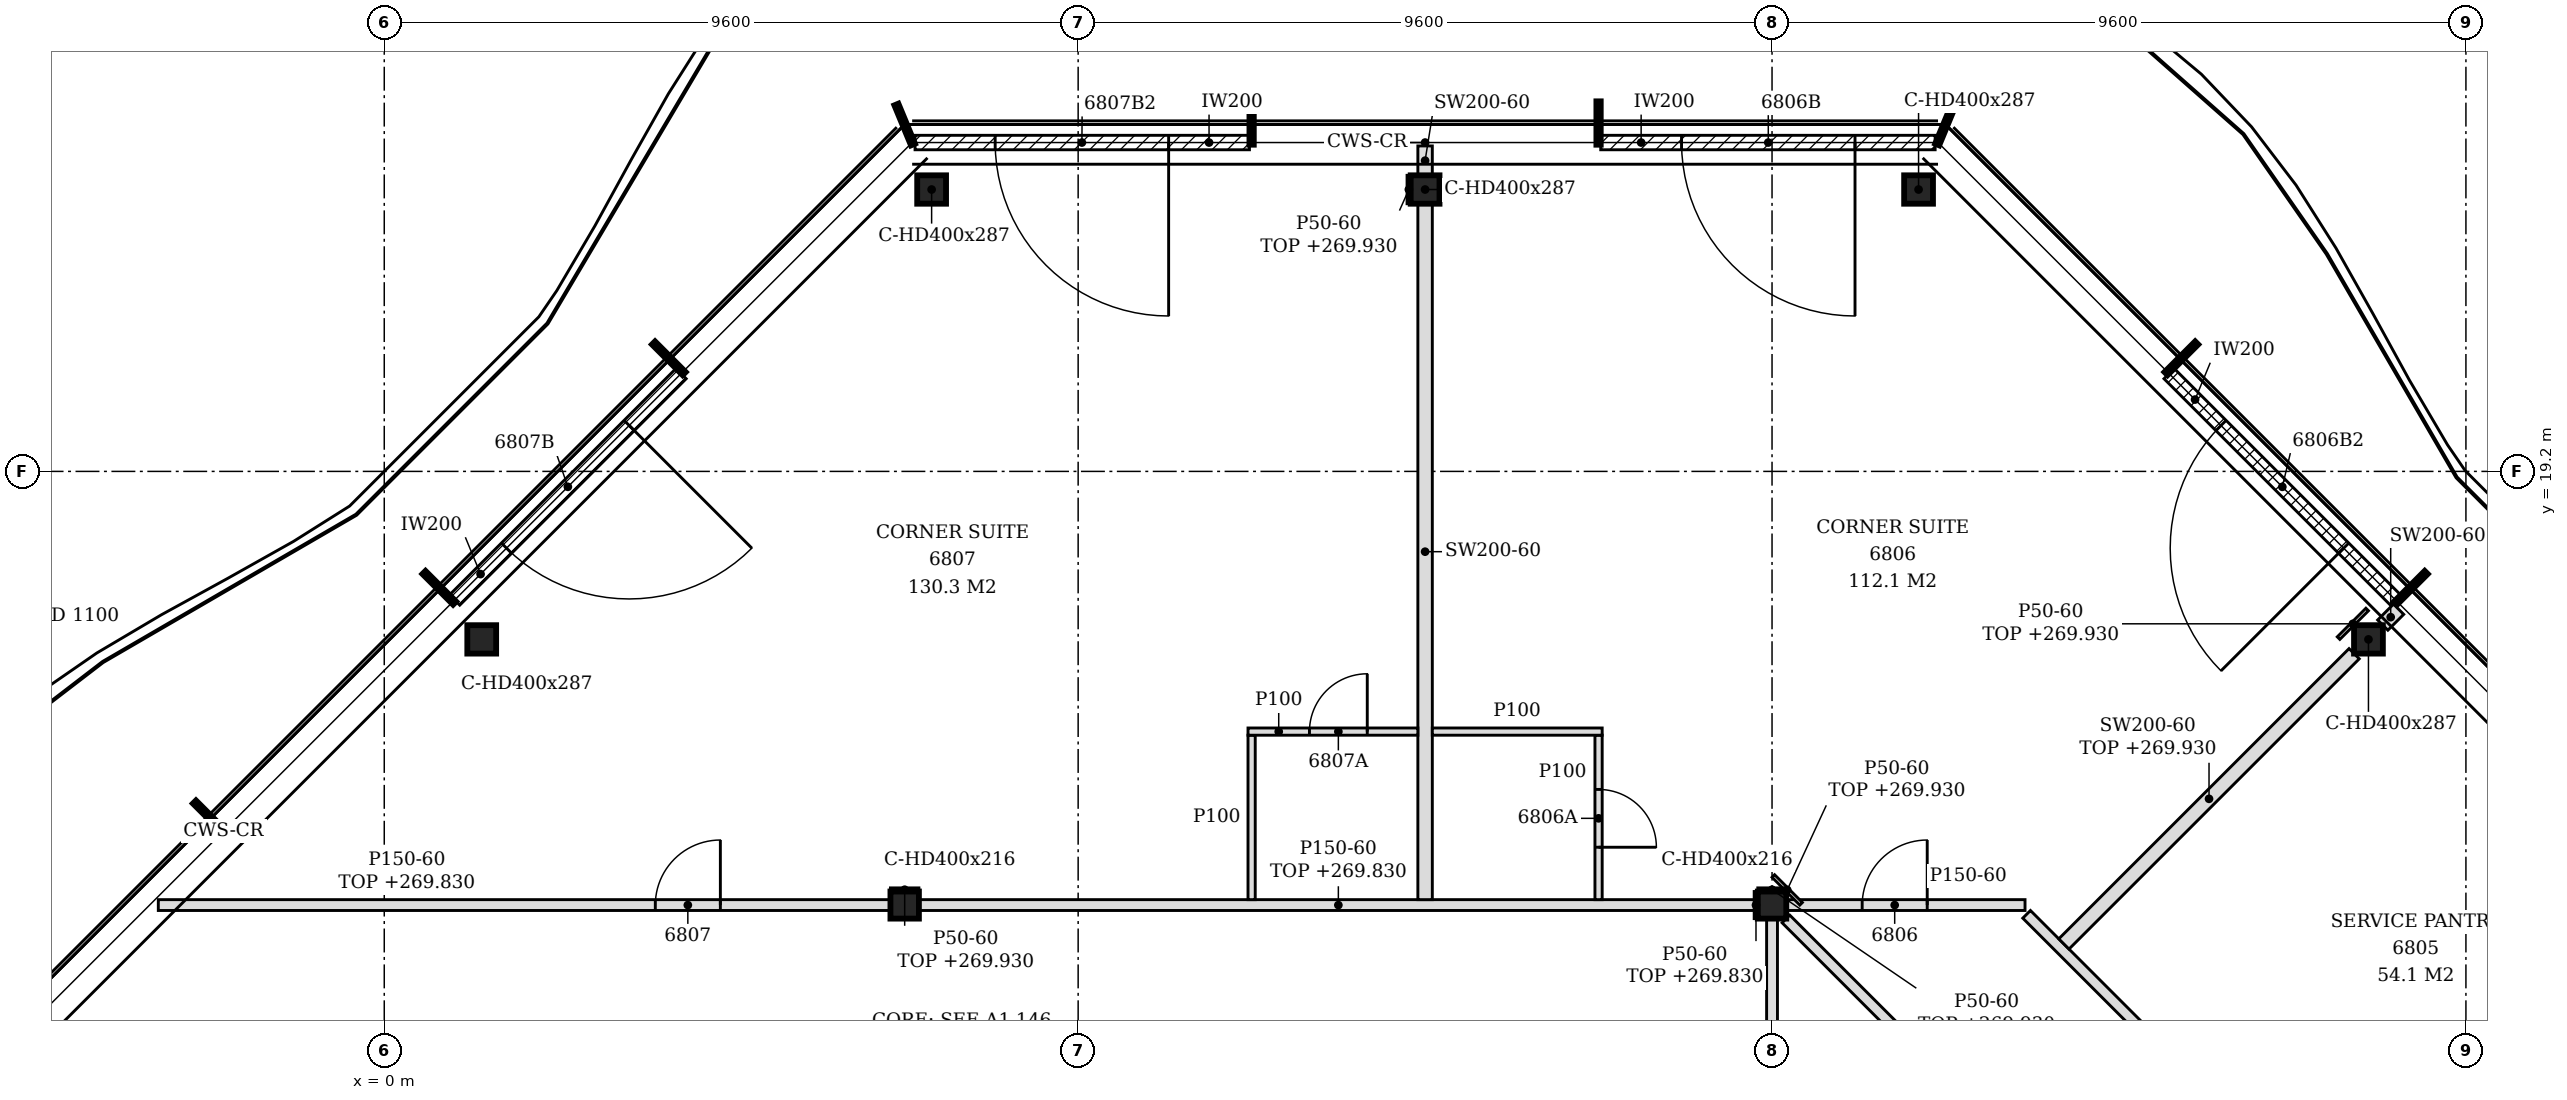
"""IFC4 building model, lengths in metres.
Left out: names, types, materials, properties, quantities, classifications, styles, units other than length and angle.
Written with IfcOpenShell. Run it as: python <this file> out.ifc"""

import sys

from ifc_helpers import new_model, si_unit, direction, frame, frame_2d, origin, origin_2d, place, context, subcontext, project, spatial, polyline, rectangle, i_section, outline, extrude, element, fill, save


model = new_model("IFC4")
c1 = context("Model", 3, precision=1e-05, world=origin(), true_north=direction((0.0, 1.0)))
c2 = subcontext(c1, "Body", "Model", "MODEL_VIEW")
j1 = project(units=[si_unit("LENGTHUNIT", "METRE"), si_unit("PLANEANGLEUNIT", "RADIAN")], contexts=[c1])
p1 = place(None, origin())
s1 = spatial("IfcSite", under=j1, at=p1, CompositionType="ELEMENT")
p2 = place(p1, origin())
s2 = spatial("IfcBuilding", under=s1, at=p2, CompositionType="ELEMENT")
p3 = place(p2, frame((0.0, 0.0, 267.0)))
s3 = spatial("IfcBuildingStorey", under=s2, at=p3, CompositionType="ELEMENT", Elevation=267.0)
for number, where, z_axis, x_axis in (
    (1, (27.451, 16.876, -0.15), (0.0, 0.0, 1.0), (1.0, 0.0, 0.0)),
    (2, (21.227, 23.1, -0.15), (0.0, 0.0, 1.0), (1.0, 0.0, 0.0)),
    (3, (14.4, 23.1, -0.15), (0.0, 0.0, 1.0), (1.0, 0.0, 0.0)),
    (4, (7.573, 23.1, -0.15), (0.0, 0.0, 1.0), (1.0, 0.0, 0.0)),
    (5, (1.348, 16.876, -0.15), (0.0, 0.0, 1.0), (1.0, 0.0, 0.0)),
):
    element("IfcColumn", number, at=place(p3, frame(where, z_axis=z_axis, x_axis=x_axis)), inside=s3, PredefinedType="COLUMN", context=c2, shape_type="SweptSolid", body=[
        extrude(i_section(OverallWidth=0.399, OverallDepth=0.393, WebThickness=0.023, FlangeThickness=0.037, FilletRadius=0.015, at=origin_2d()), origin(), (0.0, 0.0, 1.0), 3.6),
    ])
for number, where, z_axis, x_axis in (
    (6, (7.2, 13.2, -0.15), (0.0, 0.0, 1.0), (1.0, 0.0, 0.0)),
    (7, (19.2, 13.2, -0.15), (0.0, 0.0, 1.0), (1.0, 0.0, 0.0)),
):
    element("IfcColumn", number, at=place(p3, frame(where, z_axis=z_axis, x_axis=x_axis)), inside=s3, PredefinedType="COLUMN", context=c2, shape_type="SweptSolid", body=[
        extrude(i_section(OverallWidth=0.394, OverallDepth=0.375, WebThickness=0.017, FlangeThickness=0.028, FilletRadius=0.015, at=origin_2d()), origin(), (0.0, 0.0, 1.0), 3.6),
    ])
p4 = place(p3, frame((27.826, 17.42, 0.0), z_axis=(0.0, 0.0, 1.0), x_axis=(-0.707079231393, 0.707134329907, 0.0)))
e8 = element("IfcWall", 8, at=p4, inside=s3, PredefinedType="NOTDEFINED", context=c2, shape_type="SweptSolid", body=[
    extrude(rectangle(XDim=4.431, YDim=0.2, at=frame_2d((2.215, 0.0))), origin(), (0.0, 0.0, 1.0), 3.45),
])
p5 = place(p4, frame((1.015, 0.0, 0.0)))
e9 = element("IfcOpeningElement", 9, at=p5, cuts=e8, PredefinedType="OPENING", context=c2, shape_type="SweptSolid", body=[
    extrude(rectangle(XDim=2.4, YDim=2.4, at=frame_2d((1.2, 1.2))), frame((0.0, 0.11, 0.0), z_axis=(0.0, -1.0, 0.0), x_axis=(1.0, 0.0, 0.0)), (0.0, 0.0, 1.0), 0.22),
])
p6 = place(p3, frame((21.457, 23.75, 0.0), z_axis=(0.0, 0.0, 1.0), x_axis=(-1.0, 0.0, 0.0)))
e10 = element("IfcWall", 10, at=p6, inside=s3, PredefinedType="NOTDEFINED", context=c2, shape_type="SweptSolid", body=[
    extrude(rectangle(XDim=4.626, YDim=0.2, at=frame_2d((2.313, 0.0))), origin(), (0.0, 0.0, 1.0), 3.45),
])
p7 = place(p6, frame((1.108, 0.0, 0.0)))
e11 = element("IfcOpeningElement", 11, at=p7, cuts=e10, PredefinedType="OPENING", context=c2, shape_type="SweptSolid", body=[
    extrude(rectangle(XDim=2.4, YDim=2.4, at=frame_2d((1.2, 1.2))), frame((0.0, 0.11, 0.0), z_axis=(0.0, -1.0, 0.0), x_axis=(1.0, 0.0, 0.0)), (0.0, 0.0, 1.0), 0.22),
])
p8 = place(p3, frame((11.97, 23.75, 0.0), z_axis=(0.0, 0.0, 1.0), x_axis=(-1.0, 0.0, 0.0)))
e12 = element("IfcWall", 12, at=p8, inside=s3, PredefinedType="NOTDEFINED", context=c2, shape_type="SweptSolid", body=[
    extrude(rectangle(XDim=4.626, YDim=0.2, at=frame_2d((2.313, 0.0))), origin(), (0.0, 0.0, 1.0), 3.45),
])
p9 = place(p8, frame((1.118, 0.0, 0.0)))
e13 = element("IfcOpeningElement", 13, at=p9, cuts=e12, PredefinedType="OPENING", context=c2, shape_type="SweptSolid", body=[
    extrude(rectangle(XDim=2.4, YDim=2.4, at=frame_2d((1.2, 1.2))), frame((0.0, 0.11, 0.0), z_axis=(0.0, -1.0, 0.0), x_axis=(1.0, 0.0, 0.0)), (0.0, 0.0, 1.0), 0.22),
])
p10 = place(p3, frame((4.107, 20.553, 0.0), z_axis=(0.0, 0.0, 1.0), x_axis=(-0.707079231393, -0.707134329907, 0.0)))
e14 = element("IfcWall", 14, at=p10, inside=s3, PredefinedType="NOTDEFINED", context=c2, shape_type="SweptSolid", body=[
    extrude(rectangle(XDim=4.431, YDim=0.2, at=frame_2d((2.215, 0.0))), origin(), (0.0, 0.0, 1.0), 3.45),
])
p11 = place(p10, frame((1.015, 0.0, 0.0)))
e15 = element("IfcOpeningElement", 15, at=p11, cuts=e14, PredefinedType="OPENING", context=c2, shape_type="SweptSolid", body=[
    extrude(rectangle(XDim=2.4, YDim=2.4, at=frame_2d((1.2, 1.2))), frame((0.0, 0.11, 0.0), z_axis=(0.0, -1.0, 0.0), x_axis=(1.0, 0.0, 0.0)), (0.0, 0.0, 1.0), 0.22),
])
p12 = place(p3, frame((29.947, 2.453, 0.0), z_axis=(0.0, 0.0, 1.0), x_axis=(-0.707098603185, 0.707114959093, 0.0)))
e16 = element("IfcWall", 16, at=p12, inside=s3, PredefinedType="PARTITIONING", context=c2, shape_type="SweptSolid", body=[
    extrude(rectangle(XDim=14.927, YDim=0.15, at=frame_2d((7.463, 0.0))), origin(), (0.0, 0.0, 1.0), 2.88),
])
p13 = place(p12, frame((1.175, 0.0, 0.0)))
e17 = element("IfcOpeningElement", 17, at=p13, cuts=e16, PredefinedType="OPENING", context=c2, shape_type="SweptSolid", body=[
    extrude(rectangle(XDim=0.8, YDim=2.1, at=frame_2d((0.4, 1.05))), frame((0.0, 0.085, 0.0), z_axis=(0.0, -1.0, 0.0), x_axis=(1.0, 0.0, 0.0)), (0.0, 0.0, 1.0), 0.17),
])
p14 = place(p3, frame((33.341, 2.453, 0.0), z_axis=(0.0, 0.0, 1.0), x_axis=(-0.707098652635, 0.707114909645, 0.0)))
e18 = element("IfcWall", 18, at=p14, inside=s3, PredefinedType="PARTITIONING", context=c2, shape_type="SweptSolid", body=[
    extrude(rectangle(XDim=15.018, YDim=0.15, at=frame_2d((7.509, 0.0))), origin(), (0.0, 0.0, 1.0), 2.88),
])
p15 = place(p14, frame((2.347, 0.0, 0.0)))
e19 = element("IfcOpeningElement", 19, at=p15, cuts=e18, PredefinedType="OPENING", context=c2, shape_type="SweptSolid", body=[
    extrude(rectangle(XDim=1.8, YDim=2.1, at=frame_2d((0.9, 1.05))), frame((0.0, 0.085, 0.0), z_axis=(0.0, -1.0, 0.0), x_axis=(1.0, 0.0, 0.0)), (0.0, 0.0, 1.0), 0.17),
])
p16 = place(p14, frame((0.247, 0.0, 0.0)))
e20 = element("IfcOpeningElement", 20, at=p16, cuts=e18, PredefinedType="OPENING", context=c2, shape_type="SweptSolid", body=[
    extrude(rectangle(XDim=1.8, YDim=2.1, at=frame_2d((0.9, 1.05))), frame((0.0, 0.085, 0.0), z_axis=(0.0, -1.0, 0.0), x_axis=(1.0, 0.0, 0.0)), (0.0, 0.0, 1.0), 0.17),
])
p17 = place(p14, frame((10.015, 0.0, 0.0)))
e21 = element("IfcOpeningElement", 21, at=p17, cuts=e18, PredefinedType="OPENING", context=c2, shape_type="SweptSolid", body=[
    extrude(rectangle(XDim=0.9, YDim=2.1, at=frame_2d((0.45, 1.05))), frame((0.0, 0.085, 0.0), z_axis=(0.0, -1.0, 0.0), x_axis=(1.0, 0.0, 0.0)), (0.0, 0.0, 1.0), 0.17),
])
p18 = place(p3, frame((19.2, 2.587, 0.0), z_axis=(0.0, 0.0, 1.0), x_axis=(0.0, 1.0, 0.0)))
e22 = element("IfcWall", 22, at=p18, inside=s3, PredefinedType="PARTITIONING", context=c2, shape_type="SweptSolid", body=[
    extrude(rectangle(XDim=10.425, YDim=0.15, at=frame_2d((5.212, 0.0))), origin(), (0.0, 0.0, 1.0), 2.83),
])
p19 = place(p18, frame((4.012, 0.0, 0.0)))
e23 = element("IfcOpeningElement", 23, at=p19, cuts=e22, PredefinedType="OPENING", context=c2, shape_type="SweptSolid", body=[
    extrude(rectangle(XDim=0.9, YDim=2.1, at=frame_2d((0.45, 1.05))), frame((0.0, 0.085, 0.0), z_axis=(0.0, -1.0, 0.0), x_axis=(1.0, 0.0, 0.0)), (0.0, 0.0, 1.0), 0.17),
])
p20 = place(p3, frame((23.238, 12.662, 0.0), z_axis=(0.0, 0.0, 1.0), x_axis=(0.707128276734, 0.707085284986, 0.0)))
e24 = element("IfcWall", 24, at=p20, inside=s3, PredefinedType="PARTITIONING", context=c2, shape_type="SweptSolid", body=[
    extrude(rectangle(XDim=5.679, YDim=0.2, at=frame_2d((2.839, 0.0))), origin(), (0.0, 0.0, 1.0), 2.93),
])
p21 = place(p3, frame((-3.126, 13.2, 0.0), z_axis=(0.0, 0.0, 1.0), x_axis=(1.0, 0.0, 0.0)))
e25 = element("IfcWall", 25, at=p21, inside=s3, PredefinedType="PARTITIONING", context=c2, shape_type="SweptSolid", body=[
    extrude(outline(polyline([(0.0, 0.0), (10.129, 0.0), (10.129, 2.83), (1.369, 2.83), (1.367, 2.63), (0.229, 2.63), (0.227, 2.83), (0.0, 2.83), (0.0, 0.0)])), frame((0.0, 0.075, 0.0), z_axis=(0.0, -1.0, 0.0), x_axis=(1.0, 0.0, 0.0)), (0.0, 0.0, 1.0), 0.15),
])
p22 = place(p21, frame((6.876, 0.0, 0.0)))
e26 = element("IfcOpeningElement", 26, at=p22, cuts=e25, PredefinedType="OPENING", context=c2, shape_type="SweptSolid", body=[
    extrude(rectangle(XDim=0.9, YDim=2.1, at=frame_2d((0.45, 1.05))), frame((0.0, 0.085, 0.0), z_axis=(0.0, -1.0, 0.0), x_axis=(1.0, 0.0, 0.0)), (0.0, 0.0, 1.0), 0.17),
])
p23 = place(p3, frame((7.397, 13.2, 0.0), z_axis=(0.0, 0.0, 1.0), x_axis=(1.0, 0.0, 0.0)))
e27 = element("IfcWall", 27, at=p23, inside=s3, PredefinedType="PARTITIONING", context=c2, shape_type="SweptSolid", body=[
    extrude(rectangle(XDim=11.606, YDim=0.15, at=frame_2d((5.803, 0.0))), origin(), (0.0, 0.0, 1.0), 2.83),
])
p24 = place(p3, frame((19.397, 13.2, 0.0), z_axis=(0.0, 0.0, 1.0), x_axis=(1.0, 0.0, 0.0)))
e28 = element("IfcWall", 28, at=p24, inside=s3, PredefinedType="PARTITIONING", context=c2, shape_type="SweptSolid", body=[
    extrude(rectangle(XDim=3.303, YDim=0.15, at=frame_2d((1.652, 0.0))), origin(), (0.0, 0.0, 1.0), 3.45),
])
p25 = place(p24, frame((1.05, 0.0, 0.0)))
e29 = element("IfcOpeningElement", 29, at=p25, cuts=e28, PredefinedType="OPENING", context=c2, shape_type="SweptSolid", body=[
    extrude(rectangle(XDim=0.9, YDim=2.1, at=frame_2d((0.45, 1.05))), frame((0.0, 0.085, 0.0), z_axis=(0.0, -1.0, 0.0), x_axis=(1.0, 0.0, 0.0)), (0.0, 0.0, 1.0), 0.17),
])
p26 = place(p3, frame((12.0, 13.275, 0.0), z_axis=(0.0, 0.0, 1.0), x_axis=(0.0, 1.0, 0.0)))
e30 = element("IfcWall", 30, at=p26, inside=s3, PredefinedType="PARTITIONING", context=c2, shape_type="SweptSolid", body=[
    extrude(outline(polyline([(0.0, 0.0), (2.275, 0.0), (2.275, 3.45), (0.075, 3.45), (0.073, 2.83), (0.0, 2.83), (0.0, 0.0)])), frame((0.0, 0.05, 0.0), z_axis=(0.0, -1.0, 0.0), x_axis=(1.0, 0.0, 0.0)), (0.0, 0.0, 1.0), 0.1),
])
p27 = place(p3, frame((14.4, 13.275, 0.0), z_axis=(0.0, 0.0, 1.0), x_axis=(0.0, 1.0, 0.0)))
e31 = element("IfcWall", 31, at=p27, inside=s3, PredefinedType="PARTITIONING", context=c2, shape_type="SweptSolid", body=[
    extrude(outline(polyline([(0.0, 0.0), (9.629, 0.0), (9.628, 3.45), (6.03, 3.45), (6.028, 2.88), (5.82, 2.88), (5.818, 3.45), (0.075, 3.45), (0.073, 2.83), (0.0, 2.83), (0.0, 0.0)])), frame((0.0, 0.1, 0.0), z_axis=(0.0, -1.0, 0.0), x_axis=(1.0, 0.0, 0.0)), (0.0, 0.0, 1.0), 0.2),
])
p28 = place(p3, frame((16.8, 13.275, 0.0), z_axis=(0.0, 0.0, 1.0), x_axis=(0.0, 1.0, 0.0)))
e32 = element("IfcWall", 32, at=p28, inside=s3, PredefinedType="PARTITIONING", context=c2, shape_type="SweptSolid", body=[
    extrude(outline(polyline([(0.0, 0.0), (2.275, 0.0), (2.275, 3.45), (0.075, 3.45), (0.073, 2.83), (0.0, 2.83), (0.0, 0.0)])), frame((0.0, 0.05, 0.0), z_axis=(0.0, -1.0, 0.0), x_axis=(1.0, 0.0, 0.0)), (0.0, 0.0, 1.0), 0.1),
])
p29 = place(p28, frame((0.725, 0.0, 0.0)))
e33 = element("IfcOpeningElement", 33, at=p29, cuts=e32, PredefinedType="OPENING", context=c2, shape_type="SweptSolid", body=[
    extrude(rectangle(XDim=0.8, YDim=2.1, at=frame_2d((0.4, 1.05))), frame((0.0, 0.06, 0.0), z_axis=(0.0, -1.0, 0.0), x_axis=(1.0, 0.0, 0.0)), (0.0, 0.0, 1.0), 0.12),
])
p30 = place(p3, frame((11.95, 15.6, 0.0), z_axis=(0.0, 0.0, 1.0), x_axis=(1.0, 0.0, 0.0)))
e34 = element("IfcWall", 34, at=p30, inside=s3, PredefinedType="PARTITIONING", context=c2, shape_type="SweptSolid", body=[
    extrude(rectangle(XDim=2.35, YDim=0.1, at=frame_2d((1.175, 0.0))), origin(), (0.0, 0.0, 1.0), 3.45),
])
p31 = place(p30, frame((0.85, 0.0, 0.0)))
e35 = element("IfcOpeningElement", 35, at=p31, cuts=e34, PredefinedType="OPENING", context=c2, shape_type="SweptSolid", body=[
    extrude(rectangle(XDim=0.8, YDim=2.1, at=frame_2d((0.4, 1.05))), frame((0.0, 0.06, 0.0), z_axis=(0.0, -1.0, 0.0), x_axis=(1.0, 0.0, 0.0)), (0.0, 0.0, 1.0), 0.12),
])
p32 = place(p3, frame((14.5, 15.6, 0.0), z_axis=(0.0, 0.0, 1.0), x_axis=(1.0, 0.0, 0.0)))
e36 = element("IfcWall", 36, at=p32, inside=s3, PredefinedType="PARTITIONING", context=c2, shape_type="SweptSolid", body=[
    extrude(rectangle(XDim=2.35, YDim=0.1, at=frame_2d((1.175, 0.0))), origin(), (0.0, 0.0, 1.0), 3.45),
])
p33 = place(p3, frame((27.65, 17.073, 0.0), z_axis=(0.0, 0.0, 1.0), x_axis=(0.707106781187, 0.707106781187, 0.0)))
e37 = element("IfcWall", 37, at=p33, inside=s3, PredefinedType="PARTITIONING", context=c2, shape_type="SweptSolid", body=[
    extrude(rectangle(XDim=0.31, YDim=0.2, at=frame_2d((0.155, 0.0))), origin(), (0.0, 0.0, 1.0), 3.45),
])
p34 = place(p3, frame((14.4, 23.296, 0.0), z_axis=(0.0, 0.0, 1.0), x_axis=(0.0, 1.0, 0.0)))
e38 = element("IfcWall", 38, at=p34, inside=s3, PredefinedType="PARTITIONING", context=c2, shape_type="SweptSolid", body=[
    extrude(rectangle(XDim=0.406, YDim=0.2, at=frame_2d((0.203, 0.0))), origin(), (0.0, 0.0, 1.0), 3.45),
])
p35 = place(p3, frame((18.978, 13.012, 0.0), z_axis=(0.0, 0.0, 1.0), x_axis=(0.0, 1.0, 0.0)))
e39 = element("IfcWall", 39, at=p35, inside=s3, PredefinedType="PARTITIONING", context=c2, shape_type="SweptSolid", body=[
    extrude(rectangle(XDim=0.375, YDim=0.05, at=frame_2d((0.188, 0.0))), origin(), (0.0, 0.0, 1.0), 2.83),
])
p36 = place(p3, frame((19.602, 13.218, 0.0), z_axis=(0.0, 0.0, 1.0), x_axis=(-0.707106781187, 0.707106781187, 0.0)))
e40 = element("IfcWall", 40, at=p36, inside=s3, PredefinedType="PARTITIONING", context=c2, shape_type="SweptSolid", body=[
    extrude(rectangle(XDim=0.544, YDim=0.05, at=frame_2d((0.272, 0.0))), origin(), (0.0, 0.0, 1.0), 2.93),
])
p37 = place(p3, frame((27.038, 16.893, 0.0), z_axis=(0.0, 0.0, 1.0), x_axis=(0.707106781187, 0.707106781187, 0.0)))
e41 = element("IfcWall", 41, at=p37, inside=s3, PredefinedType="PARTITIONING", context=c2, shape_type="SweptSolid", body=[
    extrude(rectangle(XDim=0.56, YDim=0.05, at=frame_2d((0.28, 0.0))), origin(), (0.0, 0.0, 1.0), 2.93),
])
for number, where, z_axis, x_axis in (
    (42, (7.003, 13.413, 0.0), (0.0, 0.0, 1.0), (1.0, 0.0, 0.0)),
    (43, (19.003, 13.413, 0.0), (0.0, 0.0, 1.0), (1.0, 0.0, 0.0)),
):
    element("IfcWall", number, at=place(p3, frame(where, z_axis=z_axis, x_axis=x_axis)), inside=s3, PredefinedType="PARTITIONING", context=c2, shape_type="SweptSolid", body=[
        extrude(rectangle(XDim=0.394, YDim=0.05, at=frame_2d((0.197, 0.0))), origin(), (0.0, 0.0, 1.0), 2.93),
    ])
p38 = place(p3, frame((14.176, 22.904, 0.0), z_axis=(0.0, 0.0, 1.0), x_axis=(0.0, 1.0, 0.0)))
e44 = element("IfcWall", 44, at=p38, inside=s3, PredefinedType="PARTITIONING", context=c2, shape_type="SweptSolid", body=[
    extrude(rectangle(XDim=0.393, YDim=0.05, at=frame_2d((0.196, 0.0))), origin(), (0.0, 0.0, 1.0), 2.93),
])
p39 = place(p5, origin())
e45 = element("IfcDoor", 45, at=p39, inside=s3, OperationType="SINGLE_SWING_LEFT", PredefinedType="DOOR", context=c2, shape_type="SweptSolid", body=[
    extrude(rectangle(XDim=2.4, YDim=2.4, at=frame_2d((1.2, 1.2))), frame((0.0, 0.025, 0.0), z_axis=(0.0, -1.0, 0.0), x_axis=(1.0, 0.0, 0.0)), (0.0, 0.0, 1.0), 0.05),
])
fill(e9, e45)
p40 = place(p7, origin())
e46 = element("IfcDoor", 46, at=p40, inside=s3, OperationType="SINGLE_SWING_LEFT", PredefinedType="DOOR", context=c2, shape_type="SweptSolid", body=[
    extrude(rectangle(XDim=2.4, YDim=2.4, at=frame_2d((1.2, 1.2))), frame((0.0, 0.025, 0.0), z_axis=(0.0, -1.0, 0.0), x_axis=(1.0, 0.0, 0.0)), (0.0, 0.0, 1.0), 0.05),
])
fill(e11, e46)
p41 = place(p9, origin())
e47 = element("IfcDoor", 47, at=p41, inside=s3, OperationType="SINGLE_SWING_LEFT", PredefinedType="DOOR", context=c2, shape_type="SweptSolid", body=[
    extrude(rectangle(XDim=2.4, YDim=2.4, at=frame_2d((1.2, 1.2))), frame((0.0, 0.025, 0.0), z_axis=(0.0, -1.0, 0.0), x_axis=(1.0, 0.0, 0.0)), (0.0, 0.0, 1.0), 0.05),
])
fill(e13, e47)
p42 = place(p11, origin())
e48 = element("IfcDoor", 48, at=p42, inside=s3, OperationType="SINGLE_SWING_LEFT", PredefinedType="DOOR", context=c2, shape_type="SweptSolid", body=[
    extrude(rectangle(XDim=2.4, YDim=2.4, at=frame_2d((1.2, 1.2))), frame((0.0, 0.025, 0.0), z_axis=(0.0, -1.0, 0.0), x_axis=(1.0, 0.0, 0.0)), (0.0, 0.0, 1.0), 0.05),
])
fill(e15, e48)
p43 = place(p25, origin())
e49 = element("IfcDoor", 49, at=p43, inside=s3, OperationType="SINGLE_SWING_RIGHT", PredefinedType="DOOR", context=c2, shape_type="SweptSolid", body=[
    extrude(rectangle(XDim=0.9, YDim=2.1, at=frame_2d((0.45, 1.05))), frame((0.0, 0.025, 0.0), z_axis=(0.0, -1.0, 0.0), x_axis=(1.0, 0.0, 0.0)), (0.0, 0.0, 1.0), 0.05),
])
fill(e29, e49)
p44 = place(p29, frame((0.8, 0.0, 0.0), z_axis=(0.0, 0.0, 1.0), x_axis=(-1.0, 0.0, 0.0)))
e50 = element("IfcDoor", 50, at=p44, inside=s3, OperationType="SINGLE_SWING_RIGHT", PredefinedType="DOOR", context=c2, shape_type="SweptSolid", body=[
    extrude(rectangle(XDim=0.8, YDim=2.1, at=frame_2d((0.4, 1.05))), frame((0.0, 0.025, 0.0), z_axis=(0.0, -1.0, 0.0), x_axis=(1.0, 0.0, 0.0)), (0.0, 0.0, 1.0), 0.05),
])
fill(e33, e50)
p45 = place(p22, origin())
e51 = element("IfcDoor", 51, at=p45, inside=s3, OperationType="SINGLE_SWING_RIGHT", PredefinedType="DOOR", context=c2, shape_type="SweptSolid", body=[
    extrude(rectangle(XDim=0.9, YDim=2.1, at=frame_2d((0.45, 1.05))), frame((0.0, 0.025, 0.0), z_axis=(0.0, -1.0, 0.0), x_axis=(1.0, 0.0, 0.0)), (0.0, 0.0, 1.0), 0.05),
])
fill(e26, e51)
p46 = place(p31, origin())
e52 = element("IfcDoor", 52, at=p46, inside=s3, OperationType="SINGLE_SWING_RIGHT", PredefinedType="DOOR", context=c2, shape_type="SweptSolid", body=[
    extrude(rectangle(XDim=0.8, YDim=2.1, at=frame_2d((0.4, 1.05))), frame((0.0, 0.025, 0.0), z_axis=(0.0, -1.0, 0.0), x_axis=(1.0, 0.0, 0.0)), (0.0, 0.0, 1.0), 0.05),
])
fill(e35, e52)
save(model, sys.argv[1])
